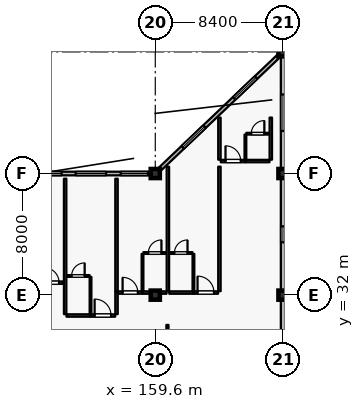
"""IFC4 building model, lengths in metres.
Left out: names, types, materials, properties, quantities, classifications, styles, units other than length and angle.
Written with IfcOpenShell. Run it as: python <this file> out.ifc"""

import sys

from ifc_helpers import new_model, si_unit, direction, frame, frame_2d, origin, origin_2d, place, context, subcontext, project, spatial, rectangle, extrude, element, fill, save


model = new_model("IFC4")
c1 = context("Model", 3, precision=1e-05, world=origin(), true_north=direction((0.0, 1.0)))
c2 = subcontext(c1, "Body", "Model", "MODEL_VIEW")
j1 = project(units=[si_unit("LENGTHUNIT", "METRE"), si_unit("PLANEANGLEUNIT", "RADIAN")], contexts=[c1])
p1 = place(None, origin())
s1 = spatial("IfcSite", under=j1, at=p1, CompositionType="ELEMENT")
p2 = place(p1, origin())
s2 = spatial("IfcBuilding", under=s1, at=p2, CompositionType="ELEMENT")
p3 = place(p2, frame((0.0, 0.0, 43.2)))
s3 = spatial("IfcBuildingStorey", under=s2, at=p3, CompositionType="ELEMENT", Elevation=43.2)
for number, where, z_axis, x_axis in (
    (1, (159.6, 40.0, 0.0), (0.0, 0.0, 1.0), (1.0, 0.0, 0.0)),
    (2, (168.0, 32.0, 0.0), (0.0, 0.0, 1.0), (1.0, 0.0, 0.0)),
    (3, (168.0, 48.0, 0.0), (0.0, 0.0, 1.0), (1.0, 0.0, 0.0)),
    (4, (159.6, 32.0, 0.0), (0.0, 0.0, 1.0), (1.0, 0.0, 0.0)),
    (5, (168.0, 40.0, 0.0), (0.0, 0.0, 1.0), (1.0, 0.0, 0.0)),
):
    element("IfcColumn", number, at=place(p3, frame(where, z_axis=z_axis, x_axis=x_axis)), inside=s3, PredefinedType="COLUMN", context=c2, shape_type="SweptSolid", body=[
        extrude(rectangle(XDim=0.6, YDim=0.6, at=origin_2d()), origin(), (0.0, 0.0, 1.0), 4.2),
    ])
p4 = place(p3, frame((151.5, 40.0, 0.0), z_axis=(0.0, 0.0, 1.0), x_axis=(1.0, 0.0, 0.0)))
e6 = element("IfcWall", 6, at=p4, inside=s3, PredefinedType="SOLIDWALL", context=c2, shape_type="SweptSolid", body=[
    extrude(rectangle(XDim=7.8, YDim=0.24, at=frame_2d((3.9, 0.0))), origin(), (0.0, 0.0, 1.0), 3.49),
])
p5 = place(p4, frame((0.135, 0.0, 0.8)))
e7 = element("IfcOpeningElement", 7, at=p5, cuts=e6, PredefinedType="OPENING", context=c2, shape_type="SweptSolid", body=[
    extrude(rectangle(XDim=1.8, YDim=1.7, at=frame_2d((0.9, 0.85))), frame((0.0, 0.13, 0.0), z_axis=(0.0, -1.0, 0.0), x_axis=(1.0, 0.0, 0.0)), (0.0, 0.0, 1.0), 0.26),
])
p6 = place(p4, frame((2.86, 0.0, 0.8)))
e8 = element("IfcOpeningElement", 8, at=p6, cuts=e6, PredefinedType="OPENING", context=c2, shape_type="SweptSolid", body=[
    extrude(rectangle(XDim=2.0, YDim=1.75, at=frame_2d((1.0, 0.875))), frame((0.0, 0.13, 0.0), z_axis=(0.0, -1.0, 0.0), x_axis=(1.0, 0.0, 0.0)), (0.0, 0.0, 1.0), 0.26),
])
p7 = place(p4, frame((5.825, 0.0, 0.8)))
e9 = element("IfcOpeningElement", 9, at=p7, cuts=e6, PredefinedType="OPENING", context=c2, shape_type="SweptSolid", body=[
    extrude(rectangle(XDim=1.8, YDim=1.7, at=frame_2d((0.9, 0.85))), frame((0.0, 0.13, 0.0), z_axis=(0.0, -1.0, 0.0), x_axis=(1.0, 0.0, 0.0)), (0.0, 0.0, 1.0), 0.26),
])
p8 = place(p3, frame((159.9, 40.286, 0.0), z_axis=(0.0, 0.0, 1.0), x_axis=(0.724156257633, 0.689635928973, 0.0)))
e10 = element("IfcWall", 10, at=p8, inside=s3, PredefinedType="SOLIDWALL", context=c2, shape_type="SweptSolid", body=[
    extrude(rectangle(XDim=10.771, YDim=0.24, at=frame_2d((5.386, 0.0))), origin(), (0.0, 0.0, 1.0), 3.49),
])
p9 = place(p8, frame((2.073, 0.0, 0.8)))
e11 = element("IfcOpeningElement", 11, at=p9, cuts=e10, PredefinedType="OPENING", context=c2, shape_type="SweptSolid", body=[
    extrude(rectangle(XDim=2.0, YDim=1.75, at=frame_2d((1.0, 0.875))), frame((0.0, 0.13, 0.0), z_axis=(0.0, -1.0, 0.0), x_axis=(1.0, 0.0, 0.0)), (0.0, 0.0, 1.0), 0.26),
])
p10 = place(p8, frame((6.747, 0.0, 0.8)))
e12 = element("IfcOpeningElement", 12, at=p10, cuts=e10, PredefinedType="OPENING", context=c2, shape_type="SweptSolid", body=[
    extrude(rectangle(XDim=2.0, YDim=1.75, at=frame_2d((1.0, 0.875))), frame((0.0, 0.13, 0.0), z_axis=(0.0, -1.0, 0.0), x_axis=(1.0, 0.0, 0.0)), (0.0, 0.0, 1.0), 0.26),
])
p11 = place(p3, frame((168.0, 47.7, 0.0), z_axis=(0.0, 0.0, 1.0), x_axis=(0.0, -1.0, 0.0)))
e13 = element("IfcWall", 13, at=p11, inside=s3, PredefinedType="SOLIDWALL", context=c2, shape_type="SweptSolid", body=[
    extrude(rectangle(XDim=7.4, YDim=0.28, at=frame_2d((3.7, 0.0))), origin(), (0.0, 0.0, 1.0), 3.3),
])
p12 = place(p11, frame((2.5, 0.0, 0.75)))
e14 = element("IfcOpeningElement", 14, at=p12, cuts=e13, PredefinedType="OPENING", context=c2, shape_type="SweptSolid", body=[
    extrude(rectangle(XDim=2.4, YDim=1.65, at=frame_2d((1.2, 0.825))), frame((0.0, 0.15, 0.0), z_axis=(0.0, -1.0, 0.0), x_axis=(1.0, 0.0, 0.0)), (0.0, 0.0, 1.0), 0.3),
])
p13 = place(p3, frame((168.0, 39.7, 0.0), z_axis=(0.0, 0.0, 1.0), x_axis=(0.0, -1.0, 0.0)))
e15 = element("IfcWall", 15, at=p13, inside=s3, PredefinedType="SOLIDWALL", context=c2, shape_type="SweptSolid", body=[
    extrude(rectangle(XDim=7.4, YDim=0.28, at=frame_2d((3.7, 0.0))), origin(), (0.0, 0.0, 1.0), 3.3),
])
p14 = place(p13, frame((3.175, 0.0, 0.75)))
e16 = element("IfcOpeningElement", 16, at=p14, cuts=e15, PredefinedType="OPENING", context=c2, shape_type="SweptSolid", body=[
    extrude(rectangle(XDim=1.05, YDim=1.65, at=frame_2d((0.525, 0.825))), frame((0.0, 0.15, 0.0), z_axis=(0.0, -1.0, 0.0), x_axis=(1.0, 0.0, 0.0)), (0.0, 0.0, 1.0), 0.3),
])
p15 = place(p3, frame((168.0, 31.7, 0.0), z_axis=(0.0, 0.0, 1.0), x_axis=(0.0, -1.0, 0.0)))
e17 = element("IfcWall", 17, at=p15, inside=s3, PredefinedType="SOLIDWALL", context=c2, shape_type="SweptSolid", body=[
    extrude(rectangle(XDim=7.4, YDim=0.28, at=frame_2d((3.7, 0.0))), origin(), (0.0, 0.0, 1.0), 3.3),
])
p16 = place(p15, frame((2.5, 0.0, 0.75)))
e18 = element("IfcOpeningElement", 18, at=p16, cuts=e17, PredefinedType="OPENING", context=c2, shape_type="SweptSolid", body=[
    extrude(rectangle(XDim=2.4, YDim=1.65, at=frame_2d((1.2, 0.825))), frame((0.0, 0.15, 0.0), z_axis=(0.0, -1.0, 0.0), x_axis=(1.0, 0.0, 0.0)), (0.0, 0.0, 1.0), 0.3),
])
p17 = place(p3, frame((151.96, 32.82, 0.0), z_axis=(0.0, 0.0, 1.0), x_axis=(1.0, 0.0, 0.0)))
e19 = element("IfcWall", 19, at=p17, inside=s3, PredefinedType="PARTITIONING", context=c2, shape_type="SweptSolid", body=[
    extrude(rectangle(XDim=1.62, YDim=0.16, at=frame_2d((0.81, 0.0))), origin(), (0.0, 0.0, 1.0), 3.935),
])
p18 = place(p17, frame((0.31, 0.0, 0.0)))
e20 = element("IfcOpeningElement", 20, at=p18, cuts=e19, PredefinedType="OPENING", context=c2, shape_type="SweptSolid", body=[
    extrude(rectangle(XDim=1.0, YDim=2.25, at=frame_2d((0.5, 1.125))), frame((0.0, 0.09, 0.0), z_axis=(0.0, -1.0, 0.0), x_axis=(1.0, 0.0, 0.0)), (0.0, 0.0, 1.0), 0.18),
])
p19 = place(p3, frame((153.76, 30.66, 0.0), z_axis=(0.0, 0.0, 1.0), x_axis=(1.0, 0.0, 0.0)))
e21 = element("IfcWall", 21, at=p19, inside=s3, PredefinedType="PARTITIONING", context=c2, shape_type="SweptSolid", body=[
    extrude(rectangle(XDim=1.57, YDim=0.16, at=frame_2d((0.785, 0.0))), origin(), (0.0, 0.0, 1.0), 3.935),
])
p20 = place(p3, frame((155.34, 30.66, 0.0), z_axis=(0.0, 0.0, 1.0), x_axis=(1.0, 0.0, 0.0)))
e22 = element("IfcWall", 22, at=p20, inside=s3, PredefinedType="PARTITIONING", context=c2, shape_type="SweptSolid", body=[
    extrude(rectangle(XDim=1.62, YDim=0.16, at=frame_2d((0.81, 0.0))), origin(), (0.0, 0.0, 1.0), 3.935),
])
p21 = place(p20, frame((0.27, 0.0, 0.0)))
e23 = element("IfcOpeningElement", 23, at=p21, cuts=e22, PredefinedType="OPENING", context=c2, shape_type="SweptSolid", body=[
    extrude(rectangle(XDim=1.08, YDim=2.3, at=frame_2d((0.54, 1.15))), frame((0.0, 0.09, 0.0), z_axis=(0.0, -1.0, 0.0), x_axis=(1.0, 0.0, 0.0)), (0.0, 0.0, 1.0), 0.18),
])
p22 = place(p3, frame((155.34, 30.75, 0.0), z_axis=(0.0, 0.0, 1.0), x_axis=(0.0, 1.0, 0.0)))
e24 = element("IfcWall", 24, at=p22, inside=s3, PredefinedType="PARTITIONING", context=c2, shape_type="SweptSolid", body=[
    extrude(rectangle(XDim=2.45, YDim=0.115, at=frame_2d((1.225, 0.0))), origin(), (0.0, 0.0, 1.0), 3.935),
])
p23 = place(p3, frame((153.77, 33.26, 0.0), z_axis=(0.0, 0.0, 1.0), x_axis=(1.0, 0.0, 0.0)))
e25 = element("IfcWall", 25, at=p23, inside=s3, PredefinedType="PARTITIONING", context=c2, shape_type="SweptSolid", body=[
    extrude(rectangle(XDim=1.51, YDim=0.115, at=frame_2d((0.755, 0.0))), origin(), (0.0, 0.0, 1.0), 3.935),
])
p24 = place(p23, frame((0.325, 0.0, 0.0)))
e26 = element("IfcOpeningElement", 26, at=p24, cuts=e25, PredefinedType="OPENING", context=c2, shape_type="SweptSolid", body=[
    extrude(rectangle(XDim=0.86, YDim=2.12, at=frame_2d((0.43, 1.06))), frame((0.0, 0.067, 0.0), z_axis=(0.0, -1.0, 0.0), x_axis=(1.0, 0.0, 0.0)), (0.0, 0.0, 1.0), 0.135),
])
p25 = place(p3, frame((153.67, 30.75, 0.0), z_axis=(0.0, 0.0, 1.0), x_axis=(0.0, 1.0, 0.0)))
e27 = element("IfcWall", 27, at=p25, inside=s3, PredefinedType="PARTITIONING", context=c2, shape_type="SweptSolid", body=[
    extrude(rectangle(XDim=8.91, YDim=0.16, at=frame_2d((4.455, 0.0))), origin(), (0.0, 0.0, 1.0), 3.935),
])
p26 = place(p3, frame((157.05, 30.75, 0.0), z_axis=(0.0, 0.0, 1.0), x_axis=(0.0, 1.0, 0.0)))
e28 = element("IfcWall", 28, at=p26, inside=s3, PredefinedType="PARTITIONING", context=c2, shape_type="SweptSolid", body=[
    extrude(rectangle(XDim=1.5, YDim=0.16, at=frame_2d((0.75, 0.0))), origin(), (0.0, 0.0, 1.0), 3.935),
])
p27 = place(p3, frame((157.14, 32.17, 0.0), z_axis=(0.0, 0.0, 1.0), x_axis=(1.0, 0.0, 0.0)))
e29 = element("IfcWall", 29, at=p27, inside=s3, PredefinedType="PARTITIONING", context=c2, shape_type="SweptSolid", body=[
    extrude(rectangle(XDim=1.62, YDim=0.16, at=frame_2d((0.81, 0.0))), origin(), (0.0, 0.0, 1.0), 3.39),
])
p28 = place(p27, frame((0.31, 0.0, 0.0)))
e30 = element("IfcOpeningElement", 30, at=p28, cuts=e29, PredefinedType="OPENING", context=c2, shape_type="SweptSolid", body=[
    extrude(rectangle(XDim=1.0, YDim=2.25, at=frame_2d((0.5, 1.125))), frame((0.0, 0.09, 0.0), z_axis=(0.0, -1.0, 0.0), x_axis=(1.0, 0.0, 0.0)), (0.0, 0.0, 1.0), 0.18),
])
p29 = place(p3, frame((158.77, 32.17, 0.0), z_axis=(0.0, 0.0, 1.0), x_axis=(1.0, 0.0, 0.0)))
e31 = element("IfcWall", 31, at=p29, inside=s3, PredefinedType="PARTITIONING", context=c2, shape_type="SweptSolid", body=[
    extrude(rectangle(XDim=0.534, YDim=0.16, at=frame_2d((0.267, 0.0))), origin(), (0.0, 0.0, 1.0), 3.39),
])
p30 = place(p3, frame((158.76, 32.26, 0.0), z_axis=(0.0, 0.0, 1.0), x_axis=(0.0, 1.0, 0.0)))
e32 = element("IfcWall", 32, at=p30, inside=s3, PredefinedType="PARTITIONING", context=c2, shape_type="SweptSolid", body=[
    extrude(rectangle(XDim=2.45, YDim=0.115, at=frame_2d((1.225, 0.0))), origin(), (0.0, 0.0, 1.0), 3.935),
])
p31 = place(p3, frame((158.82, 34.77, 0.0), z_axis=(0.0, 0.0, 1.0), x_axis=(1.0, 0.0, 0.0)))
e33 = element("IfcWall", 33, at=p31, inside=s3, PredefinedType="PARTITIONING", context=c2, shape_type="SweptSolid", body=[
    extrude(rectangle(XDim=1.51, YDim=0.115, at=frame_2d((0.755, 0.0))), origin(), (0.0, 0.0, 1.0), 3.935),
])
p32 = place(p31, frame((0.325, 0.0, 0.0)))
e34 = element("IfcOpeningElement", 34, at=p32, cuts=e33, PredefinedType="OPENING", context=c2, shape_type="SweptSolid", body=[
    extrude(rectangle(XDim=0.86, YDim=2.12, at=frame_2d((0.43, 1.06))), frame((0.0, 0.067, 0.0), z_axis=(0.0, -1.0, 0.0), x_axis=(1.0, 0.0, 0.0)), (0.0, 0.0, 1.0), 0.135),
])
p33 = place(p3, frame((157.05, 32.26, 0.0), z_axis=(0.0, 0.0, 1.0), x_axis=(0.0, 1.0, 0.0)))
e35 = element("IfcWall", 35, at=p33, inside=s3, PredefinedType="PARTITIONING", context=c2, shape_type="SweptSolid", body=[
    extrude(rectangle(XDim=7.4, YDim=0.16, at=frame_2d((3.7, 0.0))), origin(), (0.0, 0.0, 1.0), 3.935),
])
p34 = place(p3, frame((160.52, 32.17, 0.0), z_axis=(0.0, 0.0, 1.0), x_axis=(1.0, 0.0, 0.0)))
e36 = element("IfcWall", 36, at=p34, inside=s3, PredefinedType="PARTITIONING", context=c2, shape_type="SweptSolid", body=[
    extrude(rectangle(XDim=1.58, YDim=0.16, at=frame_2d((0.79, 0.0))), origin(), (0.0, 0.0, 1.0), 3.935),
])
p35 = place(p3, frame((162.11, 32.17, 0.0), z_axis=(0.0, 0.0, 1.0), x_axis=(1.0, 0.0, 0.0)))
e37 = element("IfcWall", 37, at=p35, inside=s3, PredefinedType="PARTITIONING", context=c2, shape_type="SweptSolid", body=[
    extrude(rectangle(XDim=1.62, YDim=0.16, at=frame_2d((0.81, 0.0))), origin(), (0.0, 0.0, 1.0), 3.935),
])
p36 = place(p35, frame((0.27, 0.0, 0.0)))
e38 = element("IfcOpeningElement", 38, at=p36, cuts=e37, PredefinedType="OPENING", context=c2, shape_type="SweptSolid", body=[
    extrude(rectangle(XDim=1.08, YDim=2.3, at=frame_2d((0.54, 1.15))), frame((0.0, 0.09, 0.0), z_axis=(0.0, -1.0, 0.0), x_axis=(1.0, 0.0, 0.0)), (0.0, 0.0, 1.0), 0.18),
])
p37 = place(p3, frame((162.11, 32.26, 0.0), z_axis=(0.0, 0.0, 1.0), x_axis=(0.0, 1.0, 0.0)))
e39 = element("IfcWall", 39, at=p37, inside=s3, PredefinedType="PARTITIONING", context=c2, shape_type="SweptSolid", body=[
    extrude(rectangle(XDim=2.45, YDim=0.115, at=frame_2d((1.225, 0.0))), origin(), (0.0, 0.0, 1.0), 3.935),
])
p38 = place(p3, frame((160.53, 34.77, 0.0), z_axis=(0.0, 0.0, 1.0), x_axis=(1.0, 0.0, 0.0)))
e40 = element("IfcWall", 40, at=p38, inside=s3, PredefinedType="PARTITIONING", context=c2, shape_type="SweptSolid", body=[
    extrude(rectangle(XDim=1.52, YDim=0.115, at=frame_2d((0.76, 0.0))), origin(), (0.0, 0.0, 1.0), 3.935),
])
p39 = place(p38, frame((0.33, 0.0, 0.0)))
e41 = element("IfcOpeningElement", 41, at=p39, cuts=e40, PredefinedType="OPENING", context=c2, shape_type="SweptSolid", body=[
    extrude(rectangle(XDim=0.86, YDim=2.12, at=frame_2d((0.43, 1.06))), frame((0.0, 0.067, 0.0), z_axis=(0.0, -1.0, 0.0), x_axis=(1.0, 0.0, 0.0)), (0.0, 0.0, 1.0), 0.135),
])
for number, where, z_axis, x_axis in (
    (42, (160.43, 32.26, 0.0), (0.0, 0.0, 1.0), (0.0, 1.0, 0.0)),
    (43, (163.82, 32.26, 0.0), (0.0, 0.0, 1.0), (0.0, 1.0, 0.0)),
):
    element("IfcWall", number, at=place(p3, frame(where, z_axis=z_axis, x_axis=x_axis)), inside=s3, PredefinedType="PARTITIONING", context=c2, shape_type="SweptSolid", body=[
        extrude(rectangle(XDim=8.19, YDim=0.16, at=frame_2d((4.095, 0.0))), origin(), (0.0, 0.0, 1.0), 3.935),
    ])
p40 = place(p3, frame((163.91, 40.82, 0.0), z_axis=(0.0, 0.0, 1.0), x_axis=(1.0, 0.0, 0.0)))
e44 = element("IfcWall", 44, at=p40, inside=s3, PredefinedType="PARTITIONING", context=c2, shape_type="SweptSolid", body=[
    extrude(rectangle(XDim=1.62, YDim=0.16, at=frame_2d((0.81, 0.0))), origin(), (0.0, 0.0, 1.0), 3.935),
])
p41 = place(p40, frame((0.31, 0.0, 0.0)))
e45 = element("IfcOpeningElement", 45, at=p41, cuts=e44, PredefinedType="OPENING", context=c2, shape_type="SweptSolid", body=[
    extrude(rectangle(XDim=1.0, YDim=2.25, at=frame_2d((0.5, 1.125))), frame((0.0, 0.09, 0.0), z_axis=(0.0, -1.0, 0.0), x_axis=(1.0, 0.0, 0.0)), (0.0, 0.0, 1.0), 0.18),
])
p42 = place(p3, frame((165.54, 40.82, 0.0), z_axis=(0.0, 0.0, 1.0), x_axis=(1.0, 0.0, 0.0)))
e46 = element("IfcWall", 46, at=p42, inside=s3, PredefinedType="PARTITIONING", context=c2, shape_type="SweptSolid", body=[
    extrude(rectangle(XDim=1.57, YDim=0.16, at=frame_2d((0.785, 0.0))), origin(), (0.0, 0.0, 1.0), 3.935),
])
p43 = place(p3, frame((165.53, 40.91, 0.0), z_axis=(0.0, 0.0, 1.0), x_axis=(0.0, 1.0, 0.0)))
e47 = element("IfcWall", 47, at=p43, inside=s3, PredefinedType="PARTITIONING", context=c2, shape_type="SweptSolid", body=[
    extrude(rectangle(XDim=1.65, YDim=0.115, at=frame_2d((0.825, 0.0))), origin(), (0.0, 0.0, 1.0), 3.935),
])
p44 = place(p3, frame((165.59, 42.62, 0.0), z_axis=(0.0, 0.0, 1.0), x_axis=(1.0, 0.0, 0.0)))
e48 = element("IfcWall", 48, at=p44, inside=s3, PredefinedType="PARTITIONING", context=c2, shape_type="SweptSolid", body=[
    extrude(rectangle(XDim=1.51, YDim=0.115, at=frame_2d((0.755, 0.0))), origin(), (0.0, 0.0, 1.0), 3.935),
])
p45 = place(p44, frame((0.325, 0.0, 0.0)))
e49 = element("IfcOpeningElement", 49, at=p45, cuts=e48, PredefinedType="OPENING", context=c2, shape_type="SweptSolid", body=[
    extrude(rectangle(XDim=0.86, YDim=2.12, at=frame_2d((0.43, 1.06))), frame((0.0, 0.067, 0.0), z_axis=(0.0, -1.0, 0.0), x_axis=(1.0, 0.0, 0.0)), (0.0, 0.0, 1.0), 0.135),
])
for number, where, z_axis, x_axis in (
    (50, (163.82, 40.91, 0.0), (0.0, 0.0, 1.0), (0.0, 1.0, 0.0)),
    (51, (167.2, 40.91, 0.0), (0.0, 0.0, 1.0), (0.0, 1.0, 0.0)),
):
    element("IfcWall", number, at=place(p3, frame(where, z_axis=z_axis, x_axis=x_axis)), inside=s3, PredefinedType="PARTITIONING", context=c2, shape_type="SweptSolid", body=[
        extrude(rectangle(XDim=2.77, YDim=0.16, at=frame_2d((1.385, 0.0))), origin(), (0.0, 0.0, 1.0), 3.935),
    ])
p46 = place(p3, frame((160.4, 24.96, 0.0), z_axis=(0.0, 0.0, 1.0), x_axis=(0.0, 1.0, 0.0)))
e52 = element("IfcWall", 52, at=p46, inside=s3, PredefinedType="PARTITIONING", context=c2, shape_type="SweptSolid", body=[
    extrude(rectangle(XDim=5.08, YDim=0.14, at=frame_2d((2.54, 0.0))), origin(), (0.0, 0.0, 1.0), 3.935),
])
p47 = place(p46, frame((1.59, 0.0, 0.0)))
e53 = element("IfcOpeningElement", 53, at=p47, cuts=e52, PredefinedType="OPENING", context=c2, shape_type="SweptSolid", body=[
    extrude(rectangle(XDim=1.9, YDim=2.4, at=frame_2d((0.95, 1.2))), frame((0.0, 0.08, 0.0), z_axis=(0.0, -1.0, 0.0), x_axis=(1.0, 0.0, 0.0)), (0.0, 0.0, 1.0), 0.16),
])
p48 = place(p3, frame((159.304, 32.17, 0.0), z_axis=(0.0, 0.0, 1.0), x_axis=(1.0, 0.0, 0.0)))
e54 = element("IfcWall", 54, at=p48, inside=s3, PredefinedType="PARTITIONING", context=c2, shape_type="SweptSolid", body=[
    extrude(rectangle(XDim=1.036, YDim=0.16, at=frame_2d((0.518, 0.0))), origin(), (0.0, 0.0, 1.0), 3.935),
])
p49 = place(p5, origin())
e55 = element("IfcWindow", 55, at=p49, inside=s3, PartitioningType="DOUBLE_PANEL_VERTICAL", PredefinedType="WINDOW", context=c2, shape_type="SweptSolid", body=[
    extrude(rectangle(XDim=1.8, YDim=1.7, at=frame_2d((0.9, 0.85))), frame((0.0, 0.03, 0.0), z_axis=(0.0, -1.0, 0.0), x_axis=(1.0, 0.0, 0.0)), (0.0, 0.0, 1.0), 0.06),
])
fill(e7, e55)
p50 = place(p6, origin())
e56 = element("IfcWindow", 56, at=p50, inside=s3, PartitioningType="DOUBLE_PANEL_VERTICAL", PredefinedType="WINDOW", context=c2, shape_type="SweptSolid", body=[
    extrude(rectangle(XDim=2.0, YDim=1.75, at=frame_2d((1.0, 0.875))), frame((0.0, 0.03, 0.0), z_axis=(0.0, -1.0, 0.0), x_axis=(1.0, 0.0, 0.0)), (0.0, 0.0, 1.0), 0.06),
])
fill(e8, e56)
p51 = place(p7, origin())
e57 = element("IfcWindow", 57, at=p51, inside=s3, PartitioningType="DOUBLE_PANEL_VERTICAL", PredefinedType="WINDOW", context=c2, shape_type="SweptSolid", body=[
    extrude(rectangle(XDim=1.8, YDim=1.7, at=frame_2d((0.9, 0.85))), frame((0.0, 0.03, 0.0), z_axis=(0.0, -1.0, 0.0), x_axis=(1.0, 0.0, 0.0)), (0.0, 0.0, 1.0), 0.06),
])
fill(e9, e57)
p52 = place(p9, origin())
e58 = element("IfcWindow", 58, at=p52, inside=s3, PartitioningType="DOUBLE_PANEL_VERTICAL", PredefinedType="WINDOW", context=c2, shape_type="SweptSolid", body=[
    extrude(rectangle(XDim=2.0, YDim=1.75, at=frame_2d((1.0, 0.875))), frame((0.0, 0.03, 0.0), z_axis=(0.0, -1.0, 0.0), x_axis=(1.0, 0.0, 0.0)), (0.0, 0.0, 1.0), 0.06),
])
fill(e11, e58)
p53 = place(p10, origin())
e59 = element("IfcWindow", 59, at=p53, inside=s3, PartitioningType="DOUBLE_PANEL_VERTICAL", PredefinedType="WINDOW", context=c2, shape_type="SweptSolid", body=[
    extrude(rectangle(XDim=2.0, YDim=1.75, at=frame_2d((1.0, 0.875))), frame((0.0, 0.03, 0.0), z_axis=(0.0, -1.0, 0.0), x_axis=(1.0, 0.0, 0.0)), (0.0, 0.0, 1.0), 0.06),
])
fill(e12, e59)
p54 = place(p12, origin())
e60 = element("IfcWindow", 60, at=p54, inside=s3, PartitioningType="DOUBLE_PANEL_VERTICAL", PredefinedType="WINDOW", context=c2, shape_type="SweptSolid", body=[
    extrude(rectangle(XDim=2.4, YDim=1.65, at=frame_2d((1.2, 0.825))), frame((0.0, 0.03, 0.0), z_axis=(0.0, -1.0, 0.0), x_axis=(1.0, 0.0, 0.0)), (0.0, 0.0, 1.0), 0.06),
])
fill(e14, e60)
p55 = place(p14, origin())
e61 = element("IfcWindow", 61, at=p55, inside=s3, PartitioningType="SINGLE_PANEL", PredefinedType="WINDOW", context=c2, shape_type="SweptSolid", body=[
    extrude(rectangle(XDim=1.05, YDim=1.65, at=frame_2d((0.525, 0.825))), frame((0.0, 0.03, 0.0), z_axis=(0.0, -1.0, 0.0), x_axis=(1.0, 0.0, 0.0)), (0.0, 0.0, 1.0), 0.06),
])
fill(e16, e61)
p56 = place(p18, origin())
e62 = element("IfcDoor", 62, at=p56, inside=s3, OperationType="SINGLE_SWING_LEFT", PredefinedType="DOOR", context=c2, shape_type="SweptSolid", body=[
    extrude(rectangle(XDim=1.0, YDim=2.25, at=frame_2d((0.5, 1.125))), frame((0.0, 0.025, 0.0), z_axis=(0.0, -1.0, 0.0), x_axis=(1.0, 0.0, 0.0)), (0.0, 0.0, 1.0), 0.05),
])
fill(e20, e62)
p57 = place(p21, origin())
e63 = element("IfcDoor", 63, at=p57, inside=s3, OperationType="SINGLE_SWING_LEFT", PredefinedType="DOOR", context=c2, shape_type="SweptSolid", body=[
    extrude(rectangle(XDim=1.08, YDim=2.3, at=frame_2d((0.54, 1.15))), frame((0.0, 0.025, 0.0), z_axis=(0.0, -1.0, 0.0), x_axis=(1.0, 0.0, 0.0)), (0.0, 0.0, 1.0), 0.05),
])
fill(e23, e63)
p58 = place(p24, origin())
e64 = element("IfcDoor", 64, at=p58, inside=s3, OperationType="SINGLE_SWING_RIGHT", PredefinedType="DOOR", context=c2, shape_type="SweptSolid", body=[
    extrude(rectangle(XDim=0.86, YDim=2.12, at=frame_2d((0.43, 1.06))), frame((0.0, 0.025, 0.0), z_axis=(0.0, -1.0, 0.0), x_axis=(1.0, 0.0, 0.0)), (0.0, 0.0, 1.0), 0.05),
])
fill(e26, e64)
p59 = place(p28, origin())
e65 = element("IfcDoor", 65, at=p59, inside=s3, OperationType="SINGLE_SWING_LEFT", PredefinedType="DOOR", context=c2, shape_type="SweptSolid", body=[
    extrude(rectangle(XDim=1.0, YDim=2.25, at=frame_2d((0.5, 1.125))), frame((0.0, 0.025, 0.0), z_axis=(0.0, -1.0, 0.0), x_axis=(1.0, 0.0, 0.0)), (0.0, 0.0, 1.0), 0.05),
])
fill(e30, e65)
p60 = place(p32, origin())
e66 = element("IfcDoor", 66, at=p60, inside=s3, OperationType="SINGLE_SWING_RIGHT", PredefinedType="DOOR", context=c2, shape_type="SweptSolid", body=[
    extrude(rectangle(XDim=0.86, YDim=2.12, at=frame_2d((0.43, 1.06))), frame((0.0, 0.025, 0.0), z_axis=(0.0, -1.0, 0.0), x_axis=(1.0, 0.0, 0.0)), (0.0, 0.0, 1.0), 0.05),
])
fill(e34, e66)
p61 = place(p36, origin())
e67 = element("IfcDoor", 67, at=p61, inside=s3, OperationType="SINGLE_SWING_LEFT", PredefinedType="DOOR", context=c2, shape_type="SweptSolid", body=[
    extrude(rectangle(XDim=1.08, YDim=2.3, at=frame_2d((0.54, 1.15))), frame((0.0, 0.025, 0.0), z_axis=(0.0, -1.0, 0.0), x_axis=(1.0, 0.0, 0.0)), (0.0, 0.0, 1.0), 0.05),
])
fill(e38, e67)
p62 = place(p39, origin())
e68 = element("IfcDoor", 68, at=p62, inside=s3, OperationType="SINGLE_SWING_RIGHT", PredefinedType="DOOR", context=c2, shape_type="SweptSolid", body=[
    extrude(rectangle(XDim=0.86, YDim=2.12, at=frame_2d((0.43, 1.06))), frame((0.0, 0.025, 0.0), z_axis=(0.0, -1.0, 0.0), x_axis=(1.0, 0.0, 0.0)), (0.0, 0.0, 1.0), 0.05),
])
fill(e41, e68)
p63 = place(p41, origin())
e69 = element("IfcDoor", 69, at=p63, inside=s3, OperationType="SINGLE_SWING_LEFT", PredefinedType="DOOR", context=c2, shape_type="SweptSolid", body=[
    extrude(rectangle(XDim=1.0, YDim=2.25, at=frame_2d((0.5, 1.125))), frame((0.0, 0.025, 0.0), z_axis=(0.0, -1.0, 0.0), x_axis=(1.0, 0.0, 0.0)), (0.0, 0.0, 1.0), 0.05),
])
fill(e45, e69)
p64 = place(p45, origin())
e70 = element("IfcDoor", 70, at=p64, inside=s3, OperationType="SINGLE_SWING_RIGHT", PredefinedType="DOOR", context=c2, shape_type="SweptSolid", body=[
    extrude(rectangle(XDim=0.86, YDim=2.12, at=frame_2d((0.43, 1.06))), frame((0.0, 0.025, 0.0), z_axis=(0.0, -1.0, 0.0), x_axis=(1.0, 0.0, 0.0)), (0.0, 0.0, 1.0), 0.05),
])
fill(e49, e70)
save(model, sys.argv[1])
